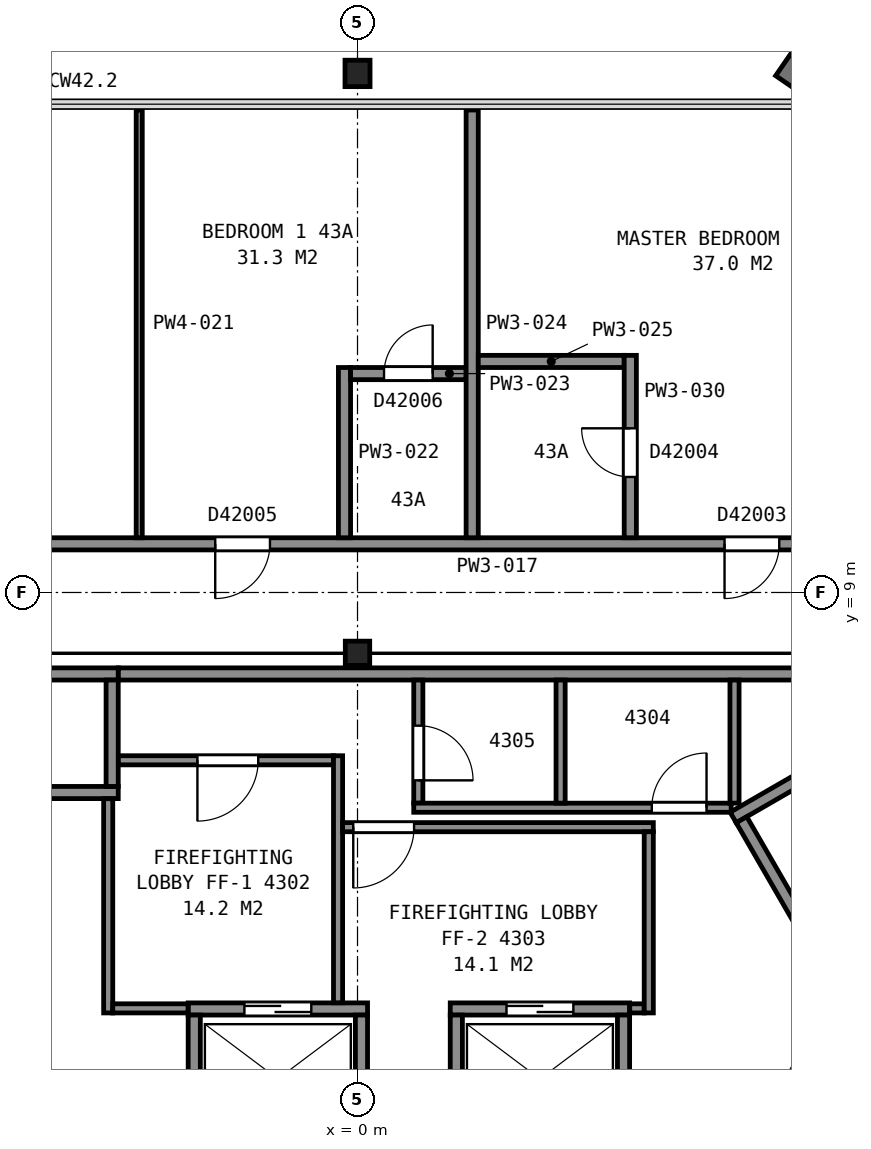
"""IFC4 building model, lengths in metres.
Left out: names, types, materials, properties, quantities, classifications, styles, units other than length and angle.
Written with IfcOpenShell. Run it as: python <this file> out.ifc"""

import sys

from ifc_helpers import new_model, si_unit, direction, frame, frame_2d, origin, origin_2d, place, context, subcontext, project, spatial, rectangle, i_section, extrude, element, fill, save


model = new_model("IFC4")
c1 = context("Model", 3, precision=1e-05, world=origin(), true_north=direction((0.0, 1.0)))
c2 = subcontext(c1, "Body", "Model", "MODEL_VIEW")
j1 = project(units=[si_unit("LENGTHUNIT", "METRE"), si_unit("PLANEANGLEUNIT", "RADIAN")], contexts=[c1])
p1 = place(None, origin())
s1 = spatial("IfcSite", under=j1, at=p1, CompositionType="ELEMENT")
p2 = place(p1, origin())
s2 = spatial("IfcBuilding", under=s1, at=p2, CompositionType="ELEMENT")
p3 = place(p2, frame((0.0, 0.0, 174.7)))
s3 = spatial("IfcBuildingStorey", under=s2, at=p3, CompositionType="ELEMENT", Elevation=174.7)
p4 = place(p3, frame((0.0, 17.317, 0.035), z_axis=(0.0, 0.185900290054, 0.982568614478), x_axis=(1.0, 0.0, 0.0)))
e1 = element("IfcColumn", 1, at=p4, inside=s3, PredefinedType="COLUMN", context=c2, shape_type="SweptSolid", body=[
    extrude(i_section(OverallWidth=0.411, OverallDepth=0.434, WebThickness=0.036, FlangeThickness=0.057, FilletRadius=0.015, at=origin_2d()), origin(), (0.0, 0.0, 1.0), 3.694),
])
p5 = place(p3, frame((0.0, 8.0, 0.0), z_axis=(0.0, 0.0, 1.0), x_axis=(1.0, 0.0, 0.0)))
e2 = element("IfcColumn", 2, at=p5, inside=s3, PredefinedType="COLUMN", context=c2, shape_type="SweptSolid", body=[
    extrude(i_section(OverallWidth=0.401, OverallDepth=0.399, WebThickness=0.025, FlangeThickness=0.04, FilletRadius=0.015, at=origin_2d()), origin(), (0.0, 0.0, 1.0), 3.7),
])
p6 = place(p3, frame((6.178, 5.299, 0.0), z_axis=(0.0, 0.0, 1.0), x_axis=(0.866019993635, 0.500009370536, 0.0)))
e3 = element("IfcWall", 3, at=p6, inside=s3, PredefinedType="PARTITIONING", context=c2, shape_type="SweptSolid", body=[
    extrude(rectangle(XDim=9.6, YDim=0.2, at=frame_2d((4.8, 0.0))), origin(), (0.0, 0.0, 1.0), 3.45),
])
p7 = place(p3, frame((7.715, 2.838, 0.0), z_axis=(0.0, 0.0, 1.0), x_axis=(-0.500049511043, 0.865996816683, 0.0)))
e4 = element("IfcWall", 4, at=p7, inside=s3, PredefinedType="PARTITIONING", context=c2, shape_type="SweptSolid", body=[
    extrude(rectangle(XDim=2.8, YDim=0.2, at=frame_2d((1.4, 0.0))), origin(), (0.0, 0.0, 1.0), 3.45),
])
p8 = place(p3, frame((-2.785, 2.15, 0.0), z_axis=(0.0, 0.0, 1.0), x_axis=(1.0, 0.0, 0.0)))
e5 = element("IfcWall", 5, at=p8, inside=s3, PredefinedType="PARTITIONING", context=c2, shape_type="SweptSolid", body=[
    extrude(rectangle(XDim=2.95, YDim=0.2, at=frame_2d((1.475, 0.0))), origin(), (0.0, 0.0, 1.0), 3.7),
])
p9 = place(p8, frame((0.925, 0.0, 0.0)))
e6 = element("IfcOpeningElement", 6, at=p9, cuts=e5, PredefinedType="OPENING", context=c2, shape_type="SweptSolid", body=[
    extrude(rectangle(XDim=1.1, YDim=2.1, at=frame_2d((0.55, 1.05))), frame((0.0, 0.11, 0.0), z_axis=(0.0, -1.0, 0.0), x_axis=(1.0, 0.0, 0.0)), (0.0, 0.0, 1.0), 0.22),
])
p10 = place(p3, frame((1.525, 2.15, 0.0), z_axis=(0.0, 0.0, 1.0), x_axis=(1.0, 0.0, 0.0)))
e7 = element("IfcWall", 7, at=p10, inside=s3, PredefinedType="PARTITIONING", context=c2, shape_type="SweptSolid", body=[
    extrude(rectangle(XDim=2.95, YDim=0.2, at=frame_2d((1.475, 0.0))), origin(), (0.0, 0.0, 1.0), 3.7),
])
p11 = place(p10, frame((0.925, 0.0, 0.0)))
e8 = element("IfcOpeningElement", 8, at=p11, cuts=e7, PredefinedType="OPENING", context=c2, shape_type="SweptSolid", body=[
    extrude(rectangle(XDim=1.1, YDim=2.1, at=frame_2d((0.55, 1.05))), frame((0.0, 0.11, 0.0), z_axis=(0.0, -1.0, 0.0), x_axis=(1.0, 0.0, 0.0)), (0.0, 0.0, 1.0), 0.22),
])
for number, where, z_axis, x_axis in (
    (9, (-6.285, 5.71, 0.0), (0.0, 0.0, 1.0), (1.0, 0.0, 0.0)),
    (10, (-6.285, 7.66, 0.0), (0.0, 0.0, 1.0), (1.0, 0.0, 0.0)),
):
    element("IfcWall", number, at=place(p3, frame(where, z_axis=z_axis, x_axis=x_axis)), inside=s3, PredefinedType="PARTITIONING", context=c2, shape_type="SweptSolid", body=[
        extrude(rectangle(XDim=2.35, YDim=0.2, at=frame_2d((1.175, 0.0))), origin(), (0.0, 0.0, 1.0), 3.7),
    ])
p12 = place(p3, frame((5.663, -1.612, 0.0), z_axis=(0.0, 0.0, 1.0), x_axis=(0.49998122708, 0.866036242063, 0.0)))
e11 = element("IfcWall", 11, at=p12, inside=s3, PredefinedType="PARTITIONING", context=c2, shape_type="SweptSolid", body=[
    extrude(rectangle(XDim=4.9, YDim=0.2, at=frame_2d((2.45, 0.0))), origin(), (0.0, 0.0, 1.0), 3.7),
])
for number, where, z_axis, x_axis in (
    (12, (4.375, 0.1, 0.0), (0.0, 0.0, 1.0), (0.0, 1.0, 0.0)),
    (13, (1.625, 0.1, 0.0), (0.0, 0.0, 1.0), (0.0, 1.0, 0.0)),
    (14, (0.065, 0.1, 0.0), (0.0, 0.0, 1.0), (0.0, 1.0, 0.0)),
    (15, (-2.685, 0.1, 0.0), (0.0, 0.0, 1.0), (0.0, 1.0, 0.0)),
):
    element("IfcWall", number, at=place(p3, frame(where, z_axis=z_axis, x_axis=x_axis)), inside=s3, PredefinedType="PARTITIONING", context=c2, shape_type="SweptSolid", body=[
        extrude(rectangle(XDim=1.95, YDim=0.2, at=frame_2d((0.975, 0.0))), origin(), (0.0, 0.0, 1.0), 3.7),
    ])
p13 = place(p3, frame((-4.035, 5.81, 0.0), z_axis=(0.0, 0.0, 1.0), x_axis=(0.0, 1.0, 0.0)))
e16 = element("IfcWall", 16, at=p13, inside=s3, PredefinedType="PARTITIONING", context=c2, shape_type="SweptSolid", body=[
    extrude(rectangle(XDim=1.75, YDim=0.2, at=frame_2d((0.875, 0.0))), origin(), (0.0, 0.0, 1.0), 3.7),
])
p14 = place(p3, frame((-4.1, 2.085, 0.0), z_axis=(0.0, 0.0, 1.0), x_axis=(0.0, 1.0, 0.0)))
e17 = element("IfcWall", 17, at=p14, inside=s3, PredefinedType="PARTITIONING", context=c2, shape_type="SweptSolid", body=[
    extrude(rectangle(XDim=3.523, YDim=0.15, at=frame_2d((1.761, 0.0))), origin(), (0.0, 0.0, 1.0), 3.45),
])
p15 = place(p3, frame((-4.025, 2.16, 0.0), z_axis=(0.0, 0.0, 1.0), x_axis=(1.0, 0.0, 0.0)))
e18 = element("IfcWall", 18, at=p15, inside=s3, PredefinedType="PARTITIONING", context=c2, shape_type="SweptSolid", body=[
    extrude(rectangle(XDim=1.238, YDim=0.15, at=frame_2d((0.619, 0.0))), origin(), (0.0, 0.0, 1.0), 3.45),
])
p16 = place(p3, frame((-3.933, 6.24, 0.0), z_axis=(0.0, 0.0, 1.0), x_axis=(1.0, 0.0, 0.0)))
e19 = element("IfcWall", 19, at=p16, inside=s3, PredefinedType="PARTITIONING", context=c2, shape_type="SweptSolid", body=[
    extrude(rectangle(XDim=3.538, YDim=0.15, at=frame_2d((1.769, 0.0))), origin(), (0.0, 0.0, 1.0), 3.45),
])
p17 = place(p16, frame((1.3, 0.0, 0.0)))
e20 = element("IfcOpeningElement", 20, at=p17, cuts=e19, PredefinedType="OPENING", context=c2, shape_type="SweptSolid", body=[
    extrude(rectangle(XDim=1.0, YDim=2.1, at=frame_2d((0.5, 1.05))), frame((0.0, 0.085, 0.0), z_axis=(0.0, -1.0, 0.0), x_axis=(1.0, 0.0, 0.0)), (0.0, 0.0, 1.0), 0.17),
])
p18 = place(p3, frame((-3.933, 7.66, 0.0), z_axis=(0.0, 0.0, 1.0), x_axis=(1.0, 0.0, 0.0)))
e21 = element("IfcWall", 21, at=p18, inside=s3, PredefinedType="PARTITIONING", context=c2, shape_type="SweptSolid", body=[
    extrude(rectangle(XDim=13.841, YDim=0.2, at=frame_2d((6.92, 0.0))), origin(), (0.0, 0.0, 1.0), 3.45),
])
p19 = place(p3, frame((-0.32, 2.252, 0.0), z_axis=(0.0, 0.0, 1.0), x_axis=(0.0, 1.0, 0.0)))
e22 = element("IfcWall", 22, at=p19, inside=s3, PredefinedType="PARTITIONING", context=c2, shape_type="SweptSolid", body=[
    extrude(rectangle(XDim=4.063, YDim=0.15, at=frame_2d((2.031, 0.0))), origin(), (0.0, 0.0, 1.0), 3.45),
])
p20 = place(p3, frame((-0.245, 5.14, 0.0), z_axis=(0.0, 0.0, 1.0), x_axis=(1.0, 0.0, 0.0)))
e23 = element("IfcWall", 23, at=p20, inside=s3, PredefinedType="PARTITIONING", context=c2, shape_type="SweptSolid", body=[
    extrude(rectangle(XDim=5.11, YDim=0.15, at=frame_2d((2.555, 0.0))), origin(), (0.0, 0.0, 1.0), 3.45),
])
p21 = place(p20, frame((0.175, 0.0, 0.0)))
e24 = element("IfcOpeningElement", 24, at=p21, cuts=e23, PredefinedType="OPENING", context=c2, shape_type="SweptSolid", body=[
    extrude(rectangle(XDim=1.0, YDim=2.1, at=frame_2d((0.5, 1.05))), frame((0.0, 0.085, 0.0), z_axis=(0.0, -1.0, 0.0), x_axis=(1.0, 0.0, 0.0)), (0.0, 0.0, 1.0), 0.17),
])
p22 = place(p3, frame((1.0, 7.56, 0.0), z_axis=(0.0, 0.0, 1.0), x_axis=(0.0, -1.0, 0.0)))
e25 = element("IfcWall", 25, at=p22, inside=s3, PredefinedType="PARTITIONING", context=c2, shape_type="SweptSolid", body=[
    extrude(rectangle(XDim=2.025, YDim=0.15, at=frame_2d((1.013, 0.0))), origin(), (0.0, 0.0, 1.0), 3.45),
])
p23 = place(p22, frame((0.75, 0.0, 0.0)))
e26 = element("IfcOpeningElement", 26, at=p23, cuts=e25, PredefinedType="OPENING", context=c2, shape_type="SweptSolid", body=[
    extrude(rectangle(XDim=0.9, YDim=2.1, at=frame_2d((0.45, 1.05))), frame((0.0, 0.085, 0.0), z_axis=(0.0, -1.0, 0.0), x_axis=(1.0, 0.0, 0.0)), (0.0, 0.0, 1.0), 0.17),
])
p24 = place(p3, frame((0.925, 5.46, 0.0), z_axis=(0.0, 0.0, 1.0), x_axis=(1.0, 0.0, 0.0)))
e27 = element("IfcWall", 27, at=p24, inside=s3, PredefinedType="PARTITIONING", context=c2, shape_type="SweptSolid", body=[
    extrude(rectangle(XDim=5.22, YDim=0.15, at=frame_2d((2.61, 0.0))), origin(), (0.0, 0.0, 1.0), 3.45),
])
p25 = place(p24, frame((3.915, 0.0, 0.0)))
e28 = element("IfcOpeningElement", 28, at=p25, cuts=e27, PredefinedType="OPENING", context=c2, shape_type="SweptSolid", body=[
    extrude(rectangle(XDim=0.9, YDim=2.1, at=frame_2d((0.45, 1.05))), frame((0.0, 0.085, 0.0), z_axis=(0.0, -1.0, 0.0), x_axis=(1.0, 0.0, 0.0)), (0.0, 0.0, 1.0), 0.17),
])
p26 = place(p3, frame((3.34, 5.535, 0.0), z_axis=(0.0, 0.0, 1.0), x_axis=(0.0, 1.0, 0.0)))
e29 = element("IfcWall", 29, at=p26, inside=s3, PredefinedType="PARTITIONING", context=c2, shape_type="SweptSolid", body=[
    extrude(rectangle(XDim=2.025, YDim=0.15, at=frame_2d((1.013, 0.0))), origin(), (0.0, 0.0, 1.0), 3.45),
])
p27 = place(p3, frame((4.477, 2.16, 0.0), z_axis=(0.0, 0.0, 1.0), x_axis=(1.0, 0.0, 0.0)))
e30 = element("IfcWall", 30, at=p27, inside=s3, PredefinedType="PARTITIONING", context=c2, shape_type="SweptSolid", body=[
    extrude(rectangle(XDim=0.238, YDim=0.15, at=frame_2d((0.119, 0.0))), origin(), (0.0, 0.0, 1.0), 3.45),
])
p28 = place(p3, frame((4.79, 2.085, 0.0), z_axis=(0.0, 0.0, 1.0), x_axis=(0.0, 1.0, 0.0)))
e31 = element("IfcWall", 31, at=p28, inside=s3, PredefinedType="PARTITIONING", context=c2, shape_type="SweptSolid", body=[
    extrude(rectangle(XDim=2.98, YDim=0.15, at=frame_2d((1.49, 0.0))), origin(), (0.0, 0.0, 1.0), 3.45),
])
p29 = place(p3, frame((6.2, 5.535, 0.0), z_axis=(0.0, 0.0, 1.0), x_axis=(0.0, 1.0, 0.0)))
e32 = element("IfcWall", 32, at=p29, inside=s3, PredefinedType="PARTITIONING", context=c2, shape_type="SweptSolid", body=[
    extrude(rectangle(XDim=2.025, YDim=0.15, at=frame_2d((1.013, 0.0))), origin(), (0.0, 0.0, 1.0), 3.45),
])
p30 = place(p3, frame((-4.075, -12.545, 0.0), z_axis=(0.0, 0.0, 1.0), x_axis=(-0.499999743747, 0.866025551732, 0.0)))
e33 = element("IfcWall", 33, at=p30, inside=s3, PredefinedType="PARTITIONING", context=c2, shape_type="SweptSolid", body=[
    extrude(rectangle(XDim=17.656, YDim=0.2, at=frame_2d((8.828, 0.0))), origin(), (0.0, 0.0, 1.0), 2.713),
])
p31 = place(p30, frame((10.08, 0.0, 0.0)))
e34 = element("IfcOpeningElement", 34, at=p31, cuts=e33, PredefinedType="OPENING", context=c2, shape_type="SweptSolid", body=[
    extrude(rectangle(XDim=0.9, YDim=2.1, at=frame_2d((0.45, 1.05))), frame((0.0, 0.11, 0.0), z_axis=(0.0, -1.0, 0.0), x_axis=(1.0, 0.0, 0.0)), (0.0, 0.0, 1.0), 0.22),
])
p32 = place(p30, frame((6.068, 0.0, 0.0)))
e35 = element("IfcOpeningElement", 35, at=p32, cuts=e33, PredefinedType="OPENING", context=c2, shape_type="SweptSolid", body=[
    extrude(rectangle(XDim=0.9, YDim=2.1, at=frame_2d((0.45, 1.05))), frame((0.0, 0.11, 0.0), z_axis=(0.0, -1.0, 0.0), x_axis=(1.0, 0.0, 0.0)), (0.0, 0.0, 1.0), 0.22),
])
p33 = place(p3, frame((-8.828, 9.8, 0.0), z_axis=(0.0, 0.0, 1.0), x_axis=(1.0, 0.0, 0.0)))
e36 = element("IfcWall", 36, at=p33, inside=s3, PredefinedType="PARTITIONING", context=c2, shape_type="SweptSolid", body=[
    extrude(rectangle(XDim=17.656, YDim=0.2, at=frame_2d((8.828, 0.0))), origin(), (0.0, 0.0, 1.0), 2.713),
])
p34 = place(p33, frame((14.864, 0.0, 0.0)))
e37 = element("IfcOpeningElement", 37, at=p34, cuts=e36, PredefinedType="OPENING", context=c2, shape_type="SweptSolid", body=[
    extrude(rectangle(XDim=0.9, YDim=2.1, at=frame_2d((0.45, 1.05))), frame((0.0, 0.11, 0.0), z_axis=(0.0, -1.0, 0.0), x_axis=(1.0, 0.0, 0.0)), (0.0, 0.0, 1.0), 0.22),
])
p35 = place(p33, frame((6.488, 0.0, 0.0)))
e38 = element("IfcOpeningElement", 38, at=p35, cuts=e36, PredefinedType="OPENING", context=c2, shape_type="SweptSolid", body=[
    extrude(rectangle(XDim=0.9, YDim=2.1, at=frame_2d((0.45, 1.05))), frame((0.0, 0.11, 0.0), z_axis=(0.0, -1.0, 0.0), x_axis=(1.0, 0.0, 0.0)), (0.0, 0.0, 1.0), 0.22),
])
p36 = place(p33, frame((2.2, 0.0, 0.0)))
e39 = element("IfcOpeningElement", 39, at=p36, cuts=e36, PredefinedType="OPENING", context=c2, shape_type="SweptSolid", body=[
    extrude(rectangle(XDim=0.9, YDim=2.1, at=frame_2d((0.45, 1.05))), frame((0.0, 0.11, 0.0), z_axis=(0.0, -1.0, 0.0), x_axis=(1.0, 0.0, 0.0)), (0.0, 0.0, 1.0), 0.22),
])
p37 = place(p3, frame((-3.59, 9.9, 0.0), z_axis=(0.0, 0.0, 1.0), x_axis=(0.0, 1.0, 0.0)))
e40 = element("IfcWall", 40, at=p37, inside=s3, PredefinedType="PARTITIONING", context=c2, shape_type="SweptSolid", body=[
    extrude(rectangle(XDim=7.035, YDim=0.1, at=frame_2d((3.518, 0.0))), origin(), (0.0, 0.0, 1.0), 2.713),
])
p38 = place(p3, frame((-0.214, 9.9, 0.0), z_axis=(0.0, 0.0, 1.0), x_axis=(0.0, 1.0, 0.0)))
e41 = element("IfcWall", 41, at=p38, inside=s3, PredefinedType="PARTITIONING", context=c2, shape_type="SweptSolid", body=[
    extrude(rectangle(XDim=2.8, YDim=0.2, at=frame_2d((1.4, 0.0))), origin(), (0.0, 0.0, 1.0), 2.713),
])
p39 = place(p3, frame((1.786, 12.6, 0.0), z_axis=(0.0, 0.0, 1.0), x_axis=(-1.0, 0.0, 0.0)))
e42 = element("IfcWall", 42, at=p39, inside=s3, PredefinedType="PARTITIONING", context=c2, shape_type="SweptSolid", body=[
    extrude(rectangle(XDim=1.9, YDim=0.2, at=frame_2d((0.95, 0.0))), origin(), (0.0, 0.0, 1.0), 2.713),
])
p40 = place(p39, frame((0.55, 0.0, 0.0)))
e43 = element("IfcOpeningElement", 43, at=p40, cuts=e42, PredefinedType="OPENING", context=c2, shape_type="SweptSolid", body=[
    extrude(rectangle(XDim=0.8, YDim=2.1, at=frame_2d((0.4, 1.05))), frame((0.0, 0.11, 0.0), z_axis=(0.0, -1.0, 0.0), x_axis=(1.0, 0.0, 0.0)), (0.0, 0.0, 1.0), 0.22),
])
p41 = place(p3, frame((1.886, 9.9, 0.0), z_axis=(0.0, 0.0, 1.0), x_axis=(0.0, 1.0, 0.0)))
e44 = element("IfcWall", 44, at=p41, inside=s3, PredefinedType="PARTITIONING", context=c2, shape_type="SweptSolid", body=[
    extrude(rectangle(XDim=7.035, YDim=0.2, at=frame_2d((3.518, 0.0))), origin(), (0.0, 0.0, 1.0), 2.713),
])
p42 = place(p3, frame((1.986, 12.8, 0.0), z_axis=(0.0, 0.0, 1.0), x_axis=(1.0, 0.0, 0.0)))
e45 = element("IfcWall", 45, at=p42, inside=s3, PredefinedType="PARTITIONING", context=c2, shape_type="SweptSolid", body=[
    extrude(rectangle(XDim=2.4, YDim=0.2, at=frame_2d((1.2, 0.0))), origin(), (0.0, 0.0, 1.0), 2.713),
])
p43 = place(p3, frame((12.916, 2.767, 0.0), z_axis=(0.0, 0.0, 1.0), x_axis=(-0.499999767326, -0.866025538119, 0.0)))
e46 = element("IfcWall", 46, at=p43, inside=s3, PredefinedType="PARTITIONING", context=c2, shape_type="SweptSolid", body=[
    extrude(rectangle(XDim=17.731, YDim=0.2, at=frame_2d((8.865, 0.0))), origin(), (0.0, 0.0, 1.0), 2.713),
])
p44 = place(p43, frame((14.293, 0.0, 0.0)))
e47 = element("IfcOpeningElement", 47, at=p44, cuts=e46, PredefinedType="OPENING", context=c2, shape_type="SweptSolid", body=[
    extrude(rectangle(XDim=0.9, YDim=2.1, at=frame_2d((0.45, 1.05))), frame((0.0, 0.11, 0.0), z_axis=(0.0, -1.0, 0.0), x_axis=(1.0, 0.0, 0.0)), (0.0, 0.0, 1.0), 0.22),
])
p45 = place(p43, frame((10.622, 0.0, 0.0)))
e48 = element("IfcOpeningElement", 48, at=p45, cuts=e46, PredefinedType="OPENING", context=c2, shape_type="SweptSolid", body=[
    extrude(rectangle(XDim=0.9, YDim=2.1, at=frame_2d((0.45, 1.05))), frame((0.0, 0.11, 0.0), z_axis=(0.0, -1.0, 0.0), x_axis=(1.0, 0.0, 0.0)), (0.0, 0.0, 1.0), 0.22),
])
p46 = place(p43, frame((3.897, 0.0, 0.0)))
e49 = element("IfcOpeningElement", 49, at=p46, cuts=e46, PredefinedType="OPENING", context=c2, shape_type="SweptSolid", body=[
    extrude(rectangle(XDim=0.9, YDim=2.1, at=frame_2d((0.45, 1.05))), frame((0.0, 0.11, 0.0), z_axis=(0.0, -1.0, 0.0), x_axis=(1.0, 0.0, 0.0)), (0.0, 0.0, 1.0), 0.22),
])
p47 = place(p43, frame((0.283, 0.0, 0.0)))
e50 = element("IfcOpeningElement", 50, at=p47, cuts=e46, PredefinedType="OPENING", context=c2, shape_type="SweptSolid", body=[
    extrude(rectangle(XDim=0.9, YDim=2.1, at=frame_2d((0.45, 1.05))), frame((0.0, 0.11, 0.0), z_axis=(0.0, -1.0, 0.0), x_axis=(1.0, 0.0, 0.0)), (0.0, 0.0, 1.0), 0.22),
])
p48 = place(p3, frame((4.486, 9.9, 0.0), z_axis=(0.0, 0.0, 1.0), x_axis=(0.0, 1.0, 0.0)))
e51 = element("IfcWall", 51, at=p48, inside=s3, PredefinedType="PARTITIONING", context=c2, shape_type="SweptSolid", body=[
    extrude(rectangle(XDim=3.0, YDim=0.2, at=frame_2d((1.5, 0.0))), origin(), (0.0, 0.0, 1.0), 2.713),
])
p49 = place(p48, frame((1.0, 0.0, 0.0)))
e52 = element("IfcOpeningElement", 52, at=p49, cuts=e51, PredefinedType="OPENING", context=c2, shape_type="SweptSolid", body=[
    extrude(rectangle(XDim=0.8, YDim=2.1, at=frame_2d((0.4, 1.05))), frame((0.0, 0.11, 0.0), z_axis=(0.0, -1.0, 0.0), x_axis=(1.0, 0.0, 0.0)), (0.0, 0.0, 1.0), 0.22),
])
p50 = place(p9, origin())
e53 = element("IfcDoor", 53, at=p50, inside=s3, OperationType="SLIDING_TO_LEFT", PredefinedType="DOOR", context=c2, shape_type="SweptSolid", body=[
    extrude(rectangle(XDim=1.1, YDim=2.1, at=frame_2d((0.55, 1.05))), frame((0.0, 0.025, 0.0), z_axis=(0.0, -1.0, 0.0), x_axis=(1.0, 0.0, 0.0)), (0.0, 0.0, 1.0), 0.05),
])
fill(e6, e53)
p51 = place(p11, origin())
e54 = element("IfcDoor", 54, at=p51, inside=s3, OperationType="SLIDING_TO_RIGHT", PredefinedType="DOOR", context=c2, shape_type="SweptSolid", body=[
    extrude(rectangle(XDim=1.1, YDim=2.1, at=frame_2d((0.55, 1.05))), frame((0.0, 0.025, 0.0), z_axis=(0.0, -1.0, 0.0), x_axis=(1.0, 0.0, 0.0)), (0.0, 0.0, 1.0), 0.05),
])
fill(e8, e54)
p52 = place(p17, origin())
e55 = element("IfcDoor", 55, at=p52, inside=s3, OperationType="SINGLE_SWING_LEFT", PredefinedType="DOOR", context=c2, shape_type="SweptSolid", body=[
    extrude(rectangle(XDim=1.0, YDim=2.1, at=frame_2d((0.5, 1.05))), frame((0.0, 0.025, 0.0), z_axis=(0.0, -1.0, 0.0), x_axis=(1.0, 0.0, 0.0)), (0.0, 0.0, 1.0), 0.05),
])
fill(e20, e55)
p53 = place(p21, origin())
e56 = element("IfcDoor", 56, at=p53, inside=s3, OperationType="SINGLE_SWING_LEFT", PredefinedType="DOOR", context=c2, shape_type="SweptSolid", body=[
    extrude(rectangle(XDim=1.0, YDim=2.1, at=frame_2d((0.5, 1.05))), frame((0.0, 0.025, 0.0), z_axis=(0.0, -1.0, 0.0), x_axis=(1.0, 0.0, 0.0)), (0.0, 0.0, 1.0), 0.05),
])
fill(e24, e56)
p54 = place(p23, origin())
e57 = element("IfcDoor", 57, at=p54, inside=s3, OperationType="SINGLE_SWING_RIGHT", PredefinedType="DOOR", context=c2, shape_type="SweptSolid", body=[
    extrude(rectangle(XDim=0.9, YDim=2.1, at=frame_2d((0.45, 1.05))), frame((0.0, 0.025, 0.0), z_axis=(0.0, -1.0, 0.0), x_axis=(1.0, 0.0, 0.0)), (0.0, 0.0, 1.0), 0.05),
])
fill(e26, e57)
p55 = place(p25, origin())
e58 = element("IfcDoor", 58, at=p55, inside=s3, OperationType="SINGLE_SWING_RIGHT", PredefinedType="DOOR", context=c2, shape_type="SweptSolid", body=[
    extrude(rectangle(XDim=0.9, YDim=2.1, at=frame_2d((0.45, 1.05))), frame((0.0, 0.025, 0.0), z_axis=(0.0, -1.0, 0.0), x_axis=(1.0, 0.0, 0.0)), (0.0, 0.0, 1.0), 0.05),
])
fill(e28, e58)
p56 = place(p34, origin())
e59 = element("IfcDoor", 59, at=p56, inside=s3, OperationType="SINGLE_SWING_LEFT", PredefinedType="DOOR", context=c2, shape_type="SweptSolid", body=[
    extrude(rectangle(XDim=0.9, YDim=2.1, at=frame_2d((0.45, 1.05))), frame((0.0, 0.025, 0.0), z_axis=(0.0, -1.0, 0.0), x_axis=(1.0, 0.0, 0.0)), (0.0, 0.0, 1.0), 0.05),
])
fill(e37, e59)
p57 = place(p35, origin())
e60 = element("IfcDoor", 60, at=p57, inside=s3, OperationType="SINGLE_SWING_LEFT", PredefinedType="DOOR", context=c2, shape_type="SweptSolid", body=[
    extrude(rectangle(XDim=0.9, YDim=2.1, at=frame_2d((0.45, 1.05))), frame((0.0, 0.025, 0.0), z_axis=(0.0, -1.0, 0.0), x_axis=(1.0, 0.0, 0.0)), (0.0, 0.0, 1.0), 0.05),
])
fill(e38, e60)
p58 = place(p40, origin())
e61 = element("IfcDoor", 61, at=p58, inside=s3, OperationType="SINGLE_SWING_LEFT", PredefinedType="DOOR", context=c2, shape_type="SweptSolid", body=[
    extrude(rectangle(XDim=0.8, YDim=2.1, at=frame_2d((0.4, 1.05))), frame((0.0, 0.025, 0.0), z_axis=(0.0, -1.0, 0.0), x_axis=(1.0, 0.0, 0.0)), (0.0, 0.0, 1.0), 0.05),
])
fill(e43, e61)
p59 = place(p49, origin())
e62 = element("IfcDoor", 62, at=p59, inside=s3, OperationType="SINGLE_SWING_RIGHT", PredefinedType="DOOR", context=c2, shape_type="SweptSolid", body=[
    extrude(rectangle(XDim=0.8, YDim=2.1, at=frame_2d((0.4, 1.05))), frame((0.0, 0.025, 0.0), z_axis=(0.0, -1.0, 0.0), x_axis=(1.0, 0.0, 0.0)), (0.0, 0.0, 1.0), 0.05),
])
fill(e52, e62)
save(model, sys.argv[1])
